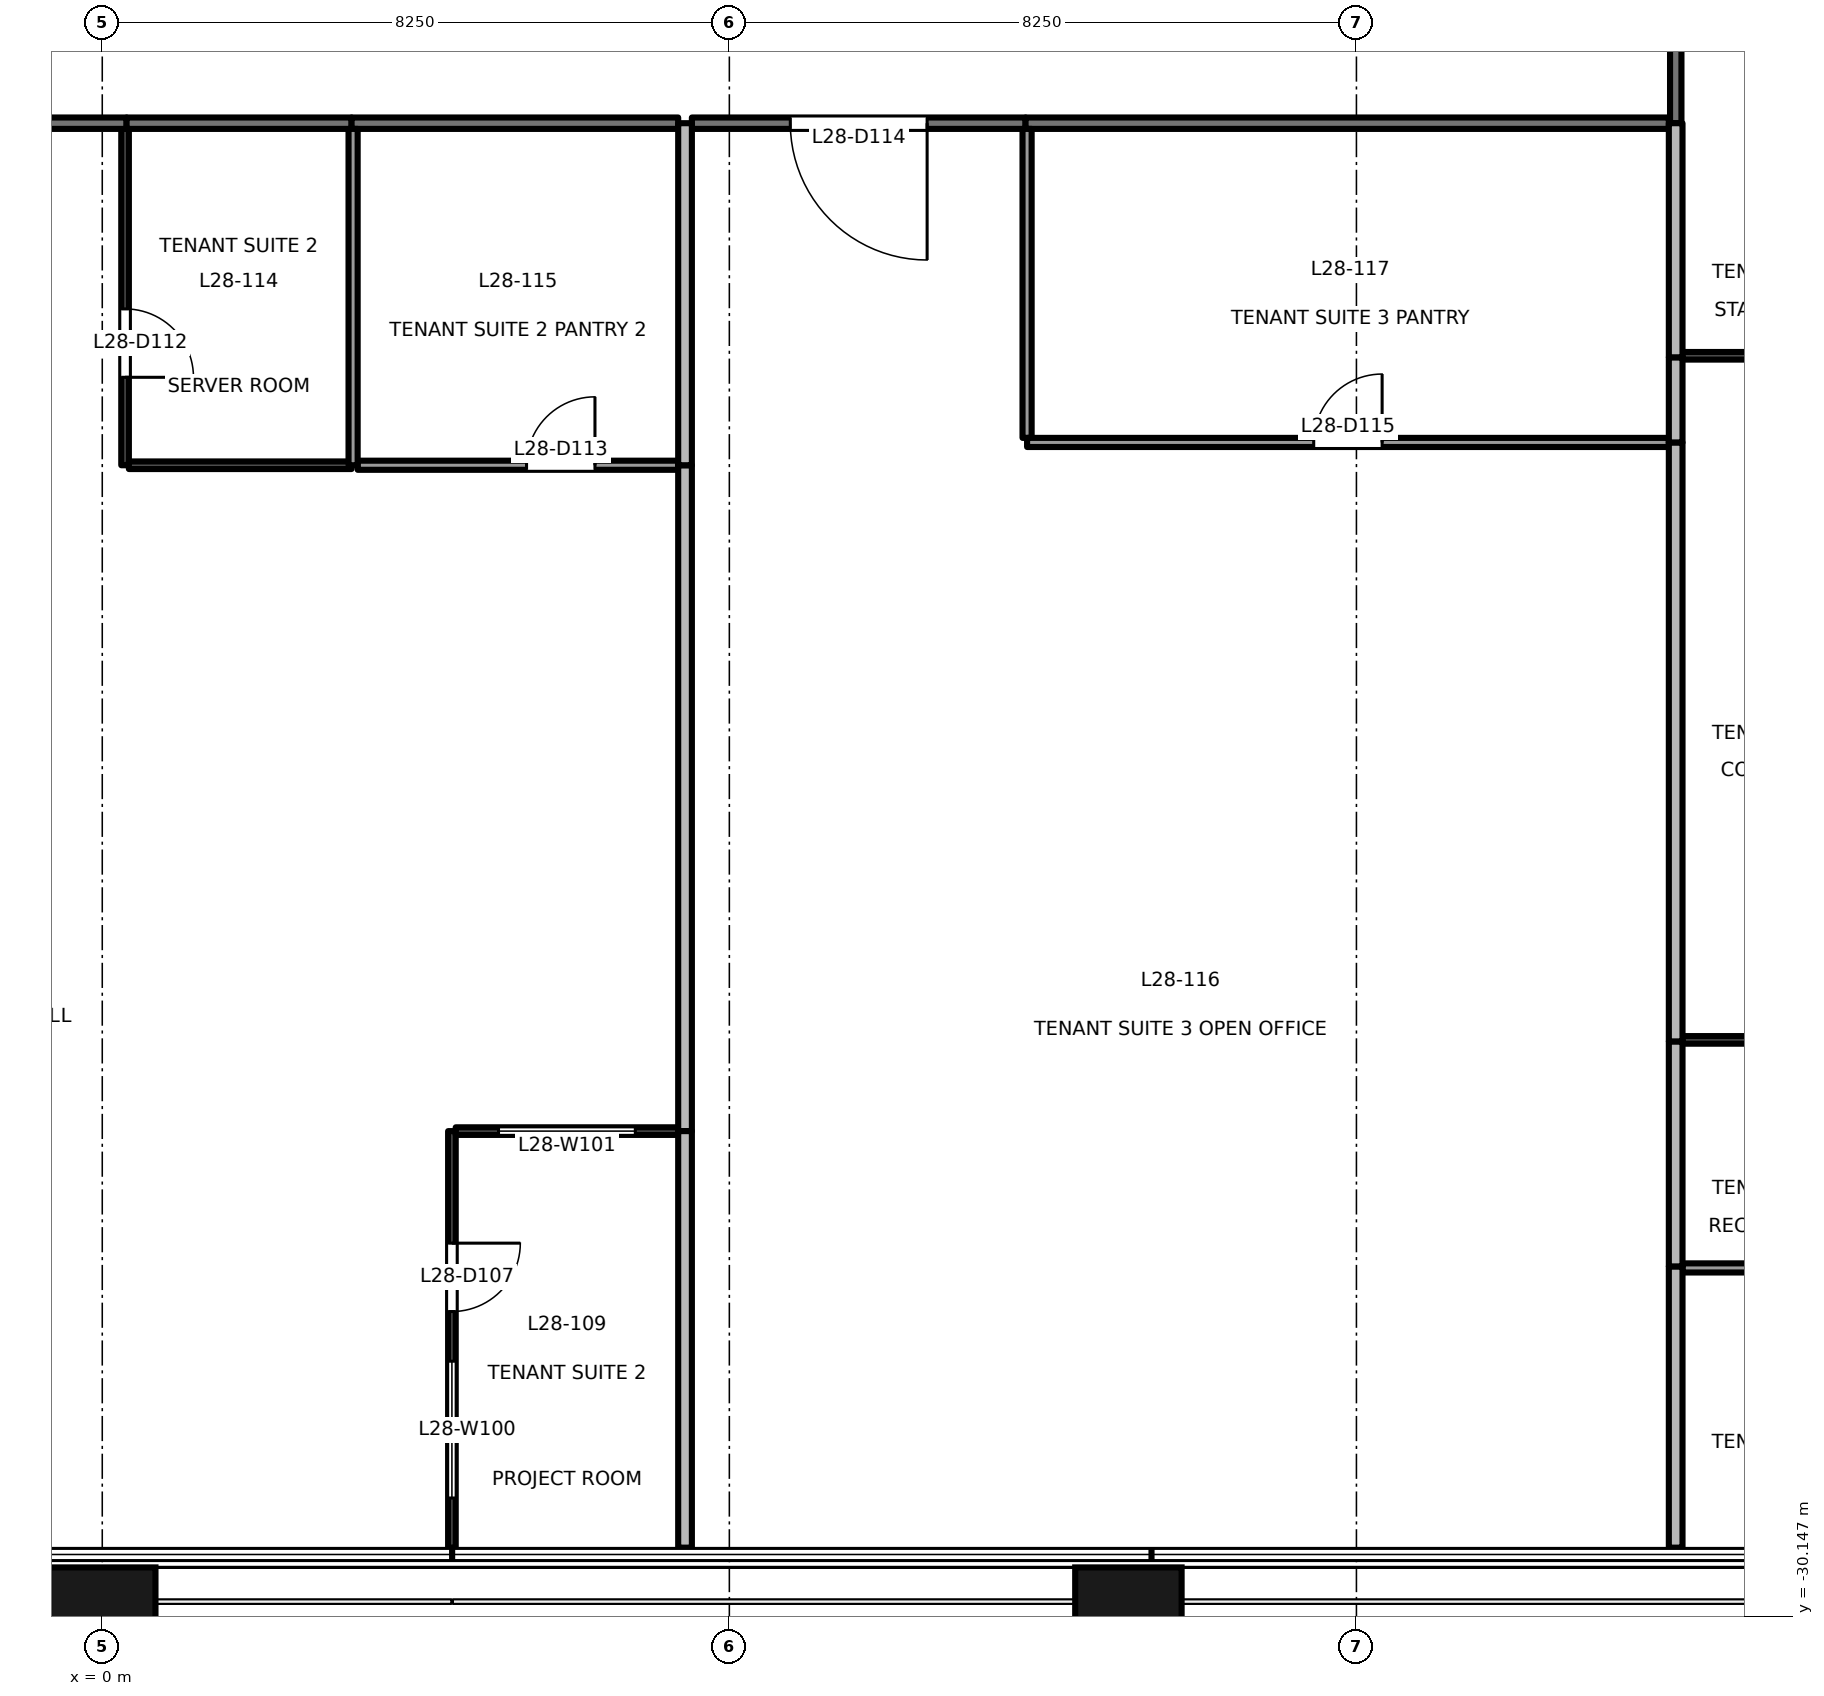
"""IFC4 building model, lengths in metres.
Left out: names, types, materials, properties, quantities, classifications, styles, units other than length and angle.
Written with IfcOpenShell. Run it as: python <this file> out.ifc"""

import sys

from ifc_helpers import new_model, si_unit, direction, frame, frame_2d, origin, origin_2d, place, context, subcontext, project, spatial, rectangle, extrude, element, fill, save


model = new_model("IFC4")
c1 = context("Model", 3, precision=1e-05, world=origin(), true_north=direction((0.0, 1.0)))
c2 = subcontext(c1, "Body", "Model", "MODEL_VIEW")
j1 = project(units=[si_unit("LENGTHUNIT", "METRE"), si_unit("PLANEANGLEUNIT", "RADIAN")], contexts=[c1])
p1 = place(None, origin())
s1 = spatial("IfcSite", under=j1, at=p1, CompositionType="ELEMENT")
p2 = place(p1, origin())
s2 = spatial("IfcBuilding", under=s1, at=p2, CompositionType="ELEMENT")
p3 = place(p2, frame((0.0, 0.0, 126.1)))
s3 = spatial("IfcBuildingStorey", under=s2, at=p3, CompositionType="ELEMENT", Elevation=126.1)
for number, where, z_axis, x_axis in (
    (1, (0.0, -30.4, -0.2), (0.0, 0.0, 1.0), (1.0, 0.0, 0.0)),
    (2, (13.5, -30.4, -0.2), (0.0, 0.0, 1.0), (1.0, 0.0, 0.0)),
):
    element("IfcColumn", number, at=place(p3, frame(where, z_axis=z_axis, x_axis=x_axis)), inside=s3, PredefinedType="COLUMN", context=c2, shape_type="SweptSolid", body=[
        extrude(rectangle(XDim=1.4, YDim=1.8, at=origin_2d()), origin(), (0.0, 0.0, 1.0), 4.0),
    ])
p4 = place(p3, frame((0.32, -10.5, 0.0), z_axis=(0.0, 0.0, 1.0), x_axis=(-1.0, 0.0, 0.0)))
e3 = element("IfcWall", 3, at=p4, inside=s3, PredefinedType="PARTITIONING", context=c2, shape_type="SweptSolid", body=[
    extrude(rectangle(XDim=6.04, YDim=0.15, at=frame_2d((3.02, 0.0))), origin(), (0.0, 0.0, 1.0), 2.9),
])
p5 = place(p4, frame((2.12, 0.0, 0.0)))
e4 = element("IfcOpeningElement", 4, at=p5, cuts=e3, PredefinedType="OPENING", context=c2, shape_type="SweptSolid", body=[
    extrude(rectangle(XDim=1.8, YDim=2.1, at=frame_2d((0.9, 1.05))), frame((0.0, 0.085, 0.0), z_axis=(0.0, -1.0, 0.0), x_axis=(1.0, 0.0, 0.0)), (0.0, 0.0, 1.0), 0.171),
])
p6 = place(p3, frame((3.28, -10.5, 0.0), z_axis=(0.0, 0.0, 1.0), x_axis=(-1.0, 0.0, 0.0)))
e5 = element("IfcWall", 5, at=p6, inside=s3, PredefinedType="PARTITIONING", context=c2, shape_type="SweptSolid", body=[
    extrude(rectangle(XDim=2.96, YDim=0.15, at=frame_2d((1.48, 0.0))), origin(), (0.0, 0.0, 1.0), 3.8),
])
p7 = place(p3, frame((7.577, -10.5, 0.0), z_axis=(0.0, 0.0, 1.0), x_axis=(-1.0, 0.0, 0.0)))
e6 = element("IfcWall", 6, at=p7, inside=s3, PredefinedType="PARTITIONING", context=c2, shape_type="SweptSolid", body=[
    extrude(rectangle(XDim=4.297, YDim=0.15, at=frame_2d((2.148, 0.0))), origin(), (0.0, 0.0, 1.0), 2.9),
])
p8 = place(p3, frame((12.147, -10.5, 0.0), z_axis=(0.0, 0.0, 1.0), x_axis=(-1.0, 0.0, 0.0)))
e7 = element("IfcWall", 7, at=p8, inside=s3, PredefinedType="PARTITIONING", context=c2, shape_type="SweptSolid", body=[
    extrude(rectangle(XDim=4.39, YDim=0.15, at=frame_2d((2.195, 0.0))), origin(), (0.0, 0.0, 1.0), 2.9),
])
p9 = place(p8, frame((1.295, 0.0, 0.0)))
e8 = element("IfcOpeningElement", 8, at=p9, cuts=e7, PredefinedType="OPENING", context=c2, shape_type="SweptSolid", body=[
    extrude(rectangle(XDim=1.8, YDim=2.1, at=frame_2d((0.9, 1.05))), frame((0.0, 0.085, 0.0), z_axis=(0.0, -1.0, 0.0), x_axis=(1.0, 0.0, 0.0)), (0.0, 0.0, 1.0), 0.171),
])
p10 = place(p3, frame((20.61, -10.5, 0.0), z_axis=(0.0, 0.0, 1.0), x_axis=(-1.0, 0.0, 0.0)))
e9 = element("IfcWall", 9, at=p10, inside=s3, PredefinedType="PARTITIONING", context=c2, shape_type="SweptSolid", body=[
    extrude(rectangle(XDim=8.463, YDim=0.15, at=frame_2d((4.231, 0.0))), origin(), (0.0, 0.0, 1.0), 2.9),
])
p11 = place(p3, frame((20.701, -8.18, 0.0), z_axis=(0.0, 0.0, 1.0), x_axis=(0.0, -1.0, 0.0)))
e10 = element("IfcWall", 10, at=p11, inside=s3, PredefinedType="PARTITIONING", context=c2, shape_type="SweptSolid", body=[
    extrude(rectangle(XDim=2.32, YDim=0.15, at=frame_2d((1.16, 0.0))), origin(), (0.0, 0.0, 1.0), 3.8),
])
p12 = place(p3, frame((4.6, -23.76, 0.0), z_axis=(0.0, 0.0, 1.0), x_axis=(0.0, -1.0, 0.0)))
e11 = element("IfcWall", 11, at=p12, inside=s3, PredefinedType="PARTITIONING", context=c2, shape_type="SweptSolid", body=[
    extrude(rectangle(XDim=5.48, YDim=0.1, at=frame_2d((2.74, 0.0))), origin(), (0.0, 0.0, 1.0), 2.9),
])
p13 = place(p12, frame((1.474, 0.0, 0.0)))
e12 = element("IfcOpeningElement", 12, at=p13, cuts=e11, PredefinedType="OPENING", context=c2, shape_type="SweptSolid", body=[
    extrude(rectangle(XDim=0.9, YDim=2.1, at=frame_2d((0.45, 1.05))), frame((0.0, 0.061, 0.0), z_axis=(0.0, -1.0, 0.0), x_axis=(1.0, 0.0, 0.0)), (0.0, 0.0, 1.0), 0.121),
])
p14 = place(p12, frame((3.027, 0.0, 0.9)))
e13 = element("IfcOpeningElement", 13, at=p14, cuts=e11, PredefinedType="OPENING", context=c2, shape_type="SweptSolid", body=[
    extrude(rectangle(XDim=1.8, YDim=1.2, at=frame_2d((0.9, 0.6))), frame((0.0, 0.061, 0.0), z_axis=(0.0, -1.0, 0.0), x_axis=(1.0, 0.0, 0.0)), (0.0, 0.0, 1.0), 0.121),
])
p15 = place(p3, frame((7.577, -23.76, 0.0), z_axis=(0.0, 0.0, 1.0), x_axis=(-1.0, 0.0, 0.0)))
e14 = element("IfcWall", 14, at=p15, inside=s3, PredefinedType="PARTITIONING", context=c2, shape_type="SweptSolid", body=[
    extrude(rectangle(XDim=2.927, YDim=0.1, at=frame_2d((1.463, 0.0))), origin(), (0.0, 0.0, 1.0), 2.9),
])
p16 = place(p15, frame((0.564, 0.0, 0.9)))
e15 = element("IfcOpeningElement", 15, at=p16, cuts=e14, PredefinedType="OPENING", context=c2, shape_type="SweptSolid", body=[
    extrude(rectangle(XDim=1.8, YDim=1.2, at=frame_2d((0.9, 0.6))), frame((0.0, 0.061, 0.0), z_axis=(0.0, -1.0, 0.0), x_axis=(1.0, 0.0, 0.0)), (0.0, 0.0, 1.0), 0.121),
])
p17 = place(p3, frame((0.3, -10.575, 0.0), z_axis=(0.0, 0.0, 1.0), x_axis=(0.0, -1.0, 0.0)))
e16 = element("IfcWall", 16, at=p17, inside=s3, PredefinedType="PARTITIONING", context=c2, shape_type="SweptSolid", body=[
    extrude(rectangle(XDim=4.425, YDim=0.1, at=frame_2d((2.212, 0.0))), origin(), (0.0, 0.0, 1.0), 3.8),
])
p18 = place(p17, frame((2.368, 0.0, 0.0)))
e17 = element("IfcOpeningElement", 17, at=p18, cuts=e16, PredefinedType="OPENING", context=c2, shape_type="SweptSolid", body=[
    extrude(rectangle(XDim=0.9, YDim=2.1, at=frame_2d((0.45, 1.05))), frame((0.0, 0.061, 0.0), z_axis=(0.0, -1.0, 0.0), x_axis=(1.0, 0.0, 0.0)), (0.0, 0.0, 1.0), 0.121),
])
p19 = place(p3, frame((0.35, -15.0, 0.0), z_axis=(0.0, 0.0, 1.0), x_axis=(1.0, 0.0, 0.0)))
e18 = element("IfcWall", 18, at=p19, inside=s3, PredefinedType="PARTITIONING", context=c2, shape_type="SweptSolid", body=[
    extrude(rectangle(XDim=2.93, YDim=0.1, at=frame_2d((1.465, 0.0))), origin(), (0.0, 0.0, 1.0), 3.8),
])
p20 = place(p3, frame((3.36, -15.0, 0.0), z_axis=(0.0, 0.0, 1.0), x_axis=(1.0, 0.0, 0.0)))
e19 = element("IfcWall", 19, at=p20, inside=s3, PredefinedType="PARTITIONING", context=c2, shape_type="SweptSolid", body=[
    extrude(rectangle(XDim=4.217, YDim=0.12, at=frame_2d((2.108, 0.0))), origin(), (0.0, 0.0, 1.0), 2.9),
])
p21 = place(p20, frame((2.222, 0.0, 0.0)))
e20 = element("IfcOpeningElement", 20, at=p21, cuts=e19, PredefinedType="OPENING", context=c2, shape_type="SweptSolid", body=[
    extrude(rectangle(XDim=0.9, YDim=2.1, at=frame_2d((0.45, 1.05))), frame((0.0, 0.071, 0.0), z_axis=(0.0, -1.0, 0.0), x_axis=(1.0, 0.0, 0.0)), (0.0, 0.0, 1.0), 0.141),
])
p22 = place(p3, frame((7.667, -15.0, 0.0), z_axis=(0.0, 0.0, 1.0), x_axis=(0.0, -1.0, 0.0)))
e21 = element("IfcWall", 21, at=p22, inside=s3, PredefinedType="PARTITIONING", context=c2, shape_type="SweptSolid", body=[
    extrude(rectangle(XDim=8.76, YDim=0.18, at=frame_2d((4.38, 0.0))), origin(), (0.0, 0.0, 1.0), 3.8),
])
p23 = place(p3, frame((7.667, -23.76, 0.0), z_axis=(0.0, 0.0, 1.0), x_axis=(0.0, -1.0, 0.0)))
e22 = element("IfcWall", 22, at=p23, inside=s3, PredefinedType="PARTITIONING", context=c2, shape_type="SweptSolid", body=[
    extrude(rectangle(XDim=5.48, YDim=0.18, at=frame_2d((2.74, 0.0))), origin(), (0.0, 0.0, 1.0), 3.8),
])
p24 = place(p3, frame((3.3, -10.575, 0.0), z_axis=(0.0, 0.0, 1.0), x_axis=(0.0, -1.0, 0.0)))
e23 = element("IfcWall", 23, at=p24, inside=s3, PredefinedType="PARTITIONING", context=c2, shape_type="SweptSolid", body=[
    extrude(rectangle(XDim=4.425, YDim=0.12, at=frame_2d((2.212, 0.0))), origin(), (0.0, 0.0, 1.0), 3.8),
])
p25 = place(p3, frame((7.667, -10.5, 0.0), z_axis=(0.0, 0.0, 1.0), x_axis=(0.0, -1.0, 0.0)))
e24 = element("IfcWall", 24, at=p25, inside=s3, PredefinedType="PARTITIONING", context=c2, shape_type="SweptSolid", body=[
    extrude(rectangle(XDim=4.5, YDim=0.18, at=frame_2d((2.25, 0.0))), origin(), (0.0, 0.0, 1.0), 3.8),
])
p26 = place(p3, frame((12.167, -10.575, 0.0), z_axis=(0.0, 0.0, 1.0), x_axis=(0.0, -1.0, 0.0)))
e25 = element("IfcWall", 25, at=p26, inside=s3, PredefinedType="PARTITIONING", context=c2, shape_type="SweptSolid", body=[
    extrude(rectangle(XDim=4.065, YDim=0.12, at=frame_2d((2.032, 0.0))), origin(), (0.0, 0.0, 1.0), 3.8),
])
p27 = place(p3, frame((12.167, -14.7, 0.0), z_axis=(0.0, 0.0, 1.0), x_axis=(1.0, 0.0, 0.0)))
e26 = element("IfcWall", 26, at=p27, inside=s3, PredefinedType="PARTITIONING", context=c2, shape_type="SweptSolid", body=[
    extrude(rectangle(XDim=8.443, YDim=0.12, at=frame_2d((4.222, 0.0))), origin(), (0.0, 0.0, 1.0), 2.9),
])
p28 = place(p27, frame((3.771, 0.0, 0.0)))
e27 = element("IfcOpeningElement", 27, at=p28, cuts=e26, PredefinedType="OPENING", context=c2, shape_type="SweptSolid", body=[
    extrude(rectangle(XDim=0.9, YDim=2.1, at=frame_2d((0.45, 1.05))), frame((0.0, 0.071, 0.0), z_axis=(0.0, -1.0, 0.0), x_axis=(1.0, 0.0, 0.0)), (0.0, 0.0, 1.0), 0.141),
])
p29 = place(p3, frame((20.7, -25.54, 0.0), z_axis=(0.0, 0.0, 1.0), x_axis=(0.0, -1.0, 0.0)))
e28 = element("IfcWall", 28, at=p29, inside=s3, PredefinedType="PARTITIONING", context=c2, shape_type="SweptSolid", body=[
    extrude(rectangle(XDim=3.7, YDim=0.18, at=frame_2d((1.85, 0.0))), origin(), (0.0, 0.0, 1.0), 3.8),
])
p30 = place(p3, frame((20.7, -22.58, 0.0), z_axis=(0.0, 0.0, 1.0), x_axis=(0.0, -1.0, 0.0)))
e29 = element("IfcWall", 29, at=p30, inside=s3, PredefinedType="PARTITIONING", context=c2, shape_type="SweptSolid", body=[
    extrude(rectangle(XDim=2.96, YDim=0.18, at=frame_2d((1.48, 0.0))), origin(), (0.0, 0.0, 1.0), 3.8),
])
p31 = place(p3, frame((20.7, -14.7, 0.0), z_axis=(0.0, 0.0, 1.0), x_axis=(0.0, -1.0, 0.0)))
e30 = element("IfcWall", 30, at=p31, inside=s3, PredefinedType="PARTITIONING", context=c2, shape_type="SweptSolid", body=[
    extrude(rectangle(XDim=7.88, YDim=0.18, at=frame_2d((3.94, 0.0))), origin(), (0.0, 0.0, 1.0), 3.8),
])
p32 = place(p3, frame((20.7, -13.58, 0.0), z_axis=(0.0, 0.0, 1.0), x_axis=(0.0, -1.0, 0.0)))
e31 = element("IfcWall", 31, at=p32, inside=s3, PredefinedType="PARTITIONING", context=c2, shape_type="SweptSolid", body=[
    extrude(rectangle(XDim=1.12, YDim=0.18, at=frame_2d((0.56, 0.0))), origin(), (0.0, 0.0, 1.0), 3.8),
])
p33 = place(p3, frame((20.7, -10.5, 0.0), z_axis=(0.0, 0.0, 1.0), x_axis=(0.0, -1.0, 0.0)))
e32 = element("IfcWall", 32, at=p33, inside=s3, PredefinedType="PARTITIONING", context=c2, shape_type="SweptSolid", body=[
    extrude(rectangle(XDim=3.08, YDim=0.18, at=frame_2d((1.54, 0.0))), origin(), (0.0, 0.0, 1.0), 3.8),
])
p34 = place(p3, frame((20.79, -25.56, 0.0), z_axis=(0.0, 0.0, 1.0), x_axis=(1.0, 0.0, 0.0)))
e33 = element("IfcWall", 33, at=p34, inside=s3, PredefinedType="PARTITIONING", context=c2, shape_type="SweptSolid", body=[
    extrude(rectangle(XDim=2.85, YDim=0.12, at=frame_2d((1.425, 0.0))), origin(), (0.0, 0.0, 1.0), 3.8),
])
for number, where, z_axis, x_axis in (
    (34, (20.79, -22.56, 0.0), (0.0, 0.0, 1.0), (1.0, 0.0, 0.0)),
    (35, (20.79, -13.56, 0.0), (0.0, 0.0, 1.0), (1.0, 0.0, 0.0)),
):
    element("IfcWall", number, at=place(p3, frame(where, z_axis=z_axis, x_axis=x_axis)), inside=s3, PredefinedType="PARTITIONING", context=c2, shape_type="SweptSolid", body=[
        extrude(rectangle(XDim=2.86, YDim=0.1, at=frame_2d((1.43, 0.0))), origin(), (0.0, 0.0, 1.0), 3.8),
    ])
p35 = place(p13, origin())
e36 = element("IfcDoor", 36, at=p35, inside=s3, OperationType="SINGLE_SWING_LEFT", PredefinedType="DOOR", context=c2, shape_type="SweptSolid", body=[
    extrude(rectangle(XDim=0.9, YDim=2.1, at=frame_2d((0.45, 1.05))), frame((0.0, 0.025, 0.0), z_axis=(0.0, -1.0, 0.0), x_axis=(1.0, 0.0, 0.0)), (0.0, 0.0, 1.0), 0.05),
])
fill(e12, e36)
p36 = place(p18, origin())
e37 = element("IfcDoor", 37, at=p36, inside=s3, OperationType="SINGLE_SWING_RIGHT", PredefinedType="DOOR", context=c2, shape_type="SweptSolid", body=[
    extrude(rectangle(XDim=0.9, YDim=2.1, at=frame_2d((0.45, 1.05))), frame((0.0, 0.025, 0.0), z_axis=(0.0, -1.0, 0.0), x_axis=(1.0, 0.0, 0.0)), (0.0, 0.0, 1.0), 0.05),
])
fill(e17, e37)
p37 = place(p21, origin())
e38 = element("IfcDoor", 38, at=p37, inside=s3, OperationType="SINGLE_SWING_RIGHT", PredefinedType="DOOR", context=c2, shape_type="SweptSolid", body=[
    extrude(rectangle(XDim=0.9, YDim=2.1, at=frame_2d((0.45, 1.05))), frame((0.0, 0.025, 0.0), z_axis=(0.0, -1.0, 0.0), x_axis=(1.0, 0.0, 0.0)), (0.0, 0.0, 1.0), 0.05),
])
fill(e20, e38)
p38 = place(p9, origin())
e39 = element("IfcDoor", 39, at=p38, inside=s3, OperationType="DOUBLE_DOOR_SINGLE_SWING", PredefinedType="DOOR", context=c2, shape_type="SweptSolid", body=[
    extrude(rectangle(XDim=1.8, YDim=2.1, at=frame_2d((0.9, 1.05))), frame((0.0, 0.025, 0.0), z_axis=(0.0, -1.0, 0.0), x_axis=(1.0, 0.0, 0.0)), (0.0, 0.0, 1.0), 0.05),
])
fill(e8, e39)
p39 = place(p28, origin())
e40 = element("IfcDoor", 40, at=p39, inside=s3, OperationType="SINGLE_SWING_RIGHT", PredefinedType="DOOR", context=c2, shape_type="SweptSolid", body=[
    extrude(rectangle(XDim=0.9, YDim=2.1, at=frame_2d((0.45, 1.05))), frame((0.0, 0.025, 0.0), z_axis=(0.0, -1.0, 0.0), x_axis=(1.0, 0.0, 0.0)), (0.0, 0.0, 1.0), 0.05),
])
fill(e27, e40)
p40 = place(p14, origin())
e41 = element("IfcWindow", 41, at=p40, inside=s3, PartitioningType="SINGLE_PANEL", PredefinedType="WINDOW", context=c2, shape_type="SweptSolid", body=[
    extrude(rectangle(XDim=1.8, YDim=1.2, at=frame_2d((0.9, 0.6))), frame((0.0, 0.03, 0.0), z_axis=(0.0, -1.0, 0.0), x_axis=(1.0, 0.0, 0.0)), (0.0, 0.0, 1.0), 0.06),
])
fill(e13, e41)
p41 = place(p16, origin())
e42 = element("IfcWindow", 42, at=p41, inside=s3, PartitioningType="SINGLE_PANEL", PredefinedType="WINDOW", context=c2, shape_type="SweptSolid", body=[
    extrude(rectangle(XDim=1.8, YDim=1.2, at=frame_2d((0.9, 0.6))), frame((0.0, 0.03, 0.0), z_axis=(0.0, -1.0, 0.0), x_axis=(1.0, 0.0, 0.0)), (0.0, 0.0, 1.0), 0.06),
])
fill(e15, e42)
save(model, sys.argv[1])
